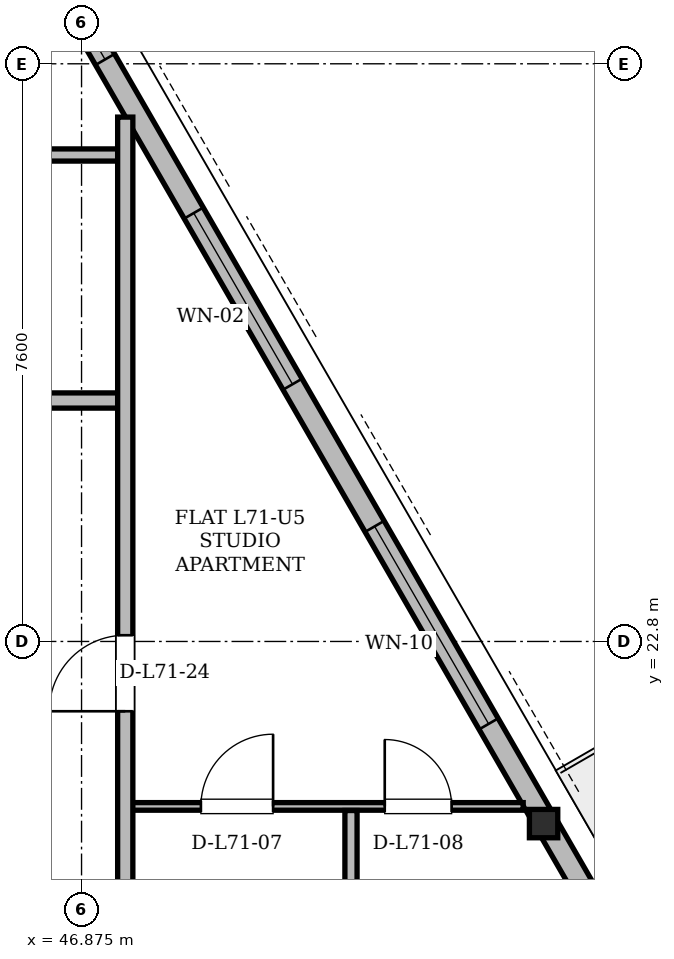
"""IFC4 building model, lengths in metres.
Left out: names, types, materials, properties, quantities, classifications, styles, units other than length and angle.
Written with IfcOpenShell. Run it as: python <this file> out.ifc"""

import sys

from ifc_helpers import new_model, si_unit, direction, frame, frame_2d, origin, origin_2d, place, context, subcontext, project, spatial, rectangle, i_section, extrude, element, fill, save


model = new_model("IFC4")
c1 = context("Model", 3, precision=1e-05, world=origin(), true_north=direction((0.0, 1.0)))
c2 = subcontext(c1, "Body", "Model", "MODEL_VIEW")
j1 = project(units=[si_unit("LENGTHUNIT", "METRE"), si_unit("PLANEANGLEUNIT", "RADIAN")], contexts=[c1])
p1 = place(None, origin())
s1 = spatial("IfcSite", under=j1, at=p1, CompositionType="ELEMENT")
p2 = place(p1, origin())
s2 = spatial("IfcBuilding", under=s1, at=p2, CompositionType="ELEMENT")
p3 = place(p2, frame((0.0, 0.0, 269.4)))
s3 = spatial("IfcBuildingStorey", under=s2, at=p3, CompositionType="ELEMENT", Elevation=269.4)
p4 = place(p3, frame((52.977, 20.423, 0.005), z_axis=(-0.011983262451, -0.009724637068, 0.999880909336), x_axis=(0.630133366333, -0.776486922384, 0.0)))
e1 = element("IfcColumn", 1, at=p4, inside=s3, PredefinedType="COLUMN", context=c2, shape_type="SweptSolid", body=[
    extrude(i_section(OverallWidth=0.373, OverallDepth=0.373, WebThickness=0.016, FlangeThickness=0.026, at=origin_2d()), origin(), (0.0, 0.0, 1.0), 3.891),
])
p5 = place(p3, frame((58.572, 10.733, 0.0), z_axis=(0.0, 0.0, 1.0), x_axis=(-0.500001430823, 0.866024577697, 0.0)))
e2 = element("IfcWall", 2, at=p5, inside=s3, PredefinedType="SOLIDWALL", context=c2, shape_type="SweptSolid", body=[
    extrude(rectangle(XDim=37.296, YDim=0.29, at=frame_2d((18.648, 0.0))), origin(), (0.0, 0.0, 1.0), 3.058),
])
p6 = place(p5, frame((8.454, 0.0, 0.0)))
e3 = element("IfcOpeningElement", 3, at=p6, cuts=e2, PredefinedType="OPENING", context=c2, shape_type="SweptSolid", body=[
    extrude(rectangle(XDim=1.5, YDim=2.2, at=frame_2d((0.75, 1.1))), frame((0.0, 0.145, 0.0), z_axis=(0.0, -1.0, 0.0), x_axis=(1.0, 0.0, 0.0)), (0.0, 0.0, 1.0), 0.29),
])
p7 = place(p5, frame((28.796, 0.0, 0.0)))
e4 = element("IfcOpeningElement", 4, at=p7, cuts=e2, PredefinedType="OPENING", context=c2, shape_type="SweptSolid", body=[
    extrude(rectangle(XDim=1.5, YDim=2.2, at=frame_2d((0.75, 1.1))), frame((0.0, 0.145, 0.0), z_axis=(0.0, -1.0, 0.0), x_axis=(1.0, 0.0, 0.0)), (0.0, 0.0, 1.0), 0.29),
])
p8 = place(p5, frame((0.77, 0.0, 0.85)))
e5 = element("IfcOpeningElement", 5, at=p8, cuts=e2, PredefinedType="OPENING", context=c2, shape_type="SweptSolid", body=[
    extrude(rectangle(XDim=1.2, YDim=1.48, at=frame_2d((0.6, 0.74))), frame((0.0, 0.145, 0.0), z_axis=(0.0, -1.0, 0.0), x_axis=(1.0, 0.0, 0.0)), (0.0, 0.0, 1.0), 0.29),
])
p9 = place(p5, frame((2.285, 0.0, 0.85)))
e6 = element("IfcOpeningElement", 6, at=p9, cuts=e2, PredefinedType="OPENING", context=c2, shape_type="SweptSolid", body=[
    extrude(rectangle(XDim=1.2, YDim=1.48, at=frame_2d((0.6, 0.74))), frame((0.0, 0.145, 0.0), z_axis=(0.0, -1.0, 0.0), x_axis=(1.0, 0.0, 0.0)), (0.0, 0.0, 1.0), 0.29),
])
p10 = place(p5, frame((6.772, 0.0, 0.85)))
e7 = element("IfcOpeningElement", 7, at=p10, cuts=e2, PredefinedType="OPENING", context=c2, shape_type="SweptSolid", body=[
    extrude(rectangle(XDim=1.2, YDim=1.48, at=frame_2d((0.6, 0.74))), frame((0.0, 0.145, 0.0), z_axis=(0.0, -1.0, 0.0), x_axis=(1.0, 0.0, 0.0)), (0.0, 0.0, 1.0), 0.29),
])
p11 = place(p5, frame((12.682, 0.0, 0.85)))
e8 = element("IfcOpeningElement", 8, at=p11, cuts=e2, PredefinedType="OPENING", context=c2, shape_type="SweptSolid", body=[
    extrude(rectangle(XDim=3.0, YDim=2.098, at=frame_2d((1.5, 1.049))), frame((0.0, 0.145, 0.0), z_axis=(0.0, -1.0, 0.0), x_axis=(1.0, 0.0, 0.0)), (0.0, 0.0, 1.0), 0.29),
])
p12 = place(p5, frame((17.842, 0.0, 0.85)))
e9 = element("IfcOpeningElement", 9, at=p12, cuts=e2, PredefinedType="OPENING", context=c2, shape_type="SweptSolid", body=[
    extrude(rectangle(XDim=2.6, YDim=1.95, at=frame_2d((1.3, 0.975))), frame((0.0, 0.145, 0.0), z_axis=(0.0, -1.0, 0.0), x_axis=(1.0, 0.0, 0.0)), (0.0, 0.0, 1.0), 0.29),
])
p13 = place(p5, frame((35.217, 0.0, 0.85)))
e10 = element("IfcOpeningElement", 10, at=p13, cuts=e2, PredefinedType="OPENING", context=c2, shape_type="SweptSolid", body=[
    extrude(rectangle(XDim=1.2, YDim=1.48, at=frame_2d((0.6, 0.74))), frame((0.0, 0.145, 0.0), z_axis=(0.0, -1.0, 0.0), x_axis=(1.0, 0.0, 0.0)), (0.0, 0.0, 1.0), 0.29),
])
p14 = place(p5, frame((33.737, 0.0, 0.85)))
e11 = element("IfcOpeningElement", 11, at=p14, cuts=e2, PredefinedType="OPENING", context=c2, shape_type="SweptSolid", body=[
    extrude(rectangle(XDim=1.2, YDim=1.48, at=frame_2d((0.6, 0.74))), frame((0.0, 0.145, 0.0), z_axis=(0.0, -1.0, 0.0), x_axis=(1.0, 0.0, 0.0)), (0.0, 0.0, 1.0), 0.29),
])
p15 = place(p5, frame((22.775, 0.0, 0.85)))
e12 = element("IfcOpeningElement", 12, at=p15, cuts=e2, PredefinedType="OPENING", context=c2, shape_type="SweptSolid", body=[
    extrude(rectangle(XDim=1.2, YDim=1.48, at=frame_2d((0.6, 0.74))), frame((0.0, 0.145, 0.0), z_axis=(0.0, -1.0, 0.0), x_axis=(1.0, 0.0, 0.0)), (0.0, 0.0, 1.0), 0.29),
])
p16 = place(p5, frame((31.663, 0.0, 0.85)))
e13 = element("IfcOpeningElement", 13, at=p16, cuts=e2, PredefinedType="OPENING", context=c2, shape_type="SweptSolid", body=[
    extrude(rectangle(XDim=1.2, YDim=1.48, at=frame_2d((0.6, 0.74))), frame((0.0, 0.145, 0.0), z_axis=(0.0, -1.0, 0.0), x_axis=(1.0, 0.0, 0.0)), (0.0, 0.0, 1.0), 0.29),
])
p17 = place(p3, frame((47.4, 20.63, 0.0), z_axis=(0.0, 0.0, 1.0), x_axis=(1.0, 0.0, 0.0)))
e14 = element("IfcWall", 14, at=p17, inside=s3, PredefinedType="PARTITIONING", context=c2, shape_type="SweptSolid", body=[
    extrude(rectangle(XDim=5.286, YDim=0.1, at=frame_2d((2.643, 0.0))), origin(), (0.0, 0.0, 1.0), 3.68),
])
p18 = place(p17, frame((1.045, 0.0, 0.0)))
e15 = element("IfcOpeningElement", 15, at=p18, cuts=e14, PredefinedType="OPENING", context=c2, shape_type="SweptSolid", body=[
    extrude(rectangle(XDim=0.95, YDim=2.1, at=frame_2d((0.475, 1.05))), frame((0.0, 0.05, 0.0), z_axis=(0.0, -1.0, 0.0), x_axis=(1.0, 0.0, 0.0)), (0.0, 0.0, 1.0), 0.1),
])
p19 = place(p17, frame((3.464, 0.0, 0.0)))
e16 = element("IfcOpeningElement", 16, at=p19, cuts=e14, PredefinedType="OPENING", context=c2, shape_type="SweptSolid", body=[
    extrude(rectangle(XDim=0.88, YDim=2.08, at=frame_2d((0.44, 1.04))), frame((0.0, 0.05, 0.0), z_axis=(0.0, -1.0, 0.0), x_axis=(1.0, 0.0, 0.0)), (0.0, 0.0, 1.0), 0.1),
])
p20 = place(p3, frame((25.6, 25.97, 0.0), z_axis=(0.0, 0.0, 1.0), x_axis=(1.0, 0.0, 0.0)))
e17 = element("IfcWall", 17, at=p20, inside=s3, PredefinedType="PARTITIONING", context=c2, shape_type="SweptSolid", body=[
    extrude(rectangle(XDim=21.85, YDim=0.2, at=frame_2d((10.925, 0.0))), origin(), (0.0, 0.0, 1.0), 3.266),
])
p21 = place(p20, frame((3.971, 0.0, 0.0)))
e18 = element("IfcOpeningElement", 18, at=p21, cuts=e17, PredefinedType="OPENING", context=c2, shape_type="SweptSolid", body=[
    extrude(rectangle(XDim=1.0, YDim=2.18, at=frame_2d((0.5, 1.09))), frame((0.0, 0.1, 0.0), z_axis=(0.0, -1.0, 0.0), x_axis=(1.0, 0.0, 0.0)), (0.0, 0.0, 1.0), 0.2),
])
p22 = place(p20, frame((11.388, 0.0, 0.0)))
e19 = element("IfcOpeningElement", 19, at=p22, cuts=e17, PredefinedType="OPENING", context=c2, shape_type="SweptSolid", body=[
    extrude(rectangle(XDim=1.0, YDim=2.18, at=frame_2d((0.5, 1.09))), frame((0.0, 0.1, 0.0), z_axis=(0.0, -1.0, 0.0), x_axis=(1.0, 0.0, 0.0)), (0.0, 0.0, 1.0), 0.2),
])
p23 = place(p20, frame((18.78, 0.0, 0.0)))
e20 = element("IfcOpeningElement", 20, at=p23, cuts=e17, PredefinedType="OPENING", context=c2, shape_type="SweptSolid", body=[
    extrude(rectangle(XDim=1.0, YDim=2.18, at=frame_2d((0.5, 1.09))), frame((0.0, 0.1, 0.0), z_axis=(0.0, -1.0, 0.0), x_axis=(1.0, 0.0, 0.0)), (0.0, 0.0, 1.0), 0.2),
])
p24 = place(p3, frame((42.418, 29.2, 0.0), z_axis=(0.0, 0.0, 1.0), x_axis=(1.0, 0.0, 0.0)))
e21 = element("IfcWall", 21, at=p24, inside=s3, PredefinedType="PARTITIONING", context=c2, shape_type="SweptSolid", body=[
    extrude(rectangle(XDim=5.114, YDim=0.16, at=frame_2d((2.557, 0.0))), origin(), (0.0, 0.0, 1.0), 3.266),
])
p25 = place(p24, frame((2.117, 0.0, 0.0)))
e22 = element("IfcOpeningElement", 22, at=p25, cuts=e21, PredefinedType="OPENING", context=c2, shape_type="SweptSolid", body=[
    extrude(rectangle(XDim=0.88, YDim=2.08, at=frame_2d((0.44, 1.04))), frame((0.0, 0.08, 0.0), z_axis=(0.0, -1.0, 0.0), x_axis=(1.0, 0.0, 0.0)), (0.0, 0.0, 1.0), 0.16),
])
p26 = place(p3, frame((47.45, 6.684, 0.0), z_axis=(0.0, 0.0, 1.0), x_axis=(0.0, 1.0, 0.0)))
e23 = element("IfcWall", 23, at=p26, inside=s3, PredefinedType="PARTITIONING", context=c2, shape_type="SweptSolid", body=[
    extrude(rectangle(XDim=23.015, YDim=0.2, at=frame_2d((11.507, 0.0))), origin(), (0.0, 0.0, 1.0), 3.058),
])
p27 = place(p26, frame((7.212, 0.0, 0.0)))
e24 = element("IfcOpeningElement", 24, at=p27, cuts=e23, PredefinedType="OPENING", context=c2, shape_type="SweptSolid", body=[
    extrude(rectangle(XDim=1.0, YDim=2.18, at=frame_2d((0.5, 1.09))), frame((0.0, 0.1, 0.0), z_axis=(0.0, -1.0, 0.0), x_axis=(1.0, 0.0, 0.0)), (0.0, 0.0, 1.0), 0.2),
])
p28 = place(p26, frame((15.198, 0.0, 0.0)))
e25 = element("IfcOpeningElement", 25, at=p28, cuts=e23, PredefinedType="OPENING", context=c2, shape_type="SweptSolid", body=[
    extrude(rectangle(XDim=1.0, YDim=2.18, at=frame_2d((0.5, 1.09))), frame((0.0, 0.1, 0.0), z_axis=(0.0, -1.0, 0.0), x_axis=(1.0, 0.0, 0.0)), (0.0, 0.0, 1.0), 0.2),
])
p29 = place(p3, frame((50.42, 17.904, 0.0), z_axis=(0.0, 0.0, 1.0), x_axis=(0.0, 1.0, 0.0)))
e26 = element("IfcWall", 26, at=p29, inside=s3, PredefinedType="PARTITIONING", context=c2, shape_type="SweptSolid", body=[
    extrude(rectangle(XDim=2.672, YDim=0.16, at=frame_2d((1.336, 0.0))), origin(), (0.0, 0.0, 1.0), 3.68),
])
p30 = place(p11, origin())
e27 = element("IfcWindow", 27, at=p30, inside=s3, PartitioningType="SINGLE_PANEL", PredefinedType="WINDOW", context=c2, shape_type="SweptSolid", body=[
    extrude(rectangle(XDim=3.0, YDim=2.098, at=frame_2d((1.5, 1.049))), frame((0.0, 0.03, 0.0), z_axis=(0.0, -1.0, 0.0), x_axis=(1.0, 0.0, 0.0)), (0.0, 0.0, 1.0), 0.06),
])
fill(e8, e27)
p31 = place(p12, origin())
e28 = element("IfcWindow", 28, at=p31, inside=s3, PartitioningType="SINGLE_PANEL", PredefinedType="WINDOW", context=c2, shape_type="SweptSolid", body=[
    extrude(rectangle(XDim=2.6, YDim=1.95, at=frame_2d((1.3, 0.975))), frame((0.0, 0.03, 0.0), z_axis=(0.0, -1.0, 0.0), x_axis=(1.0, 0.0, 0.0)), (0.0, 0.0, 1.0), 0.06),
])
fill(e9, e28)
p32 = place(p15, origin())
e29 = element("IfcWindow", 29, at=p32, inside=s3, PartitioningType="SINGLE_PANEL", PredefinedType="WINDOW", context=c2, shape_type="SweptSolid", body=[
    extrude(rectangle(XDim=1.2, YDim=1.48, at=frame_2d((0.6, 0.74))), frame((0.0, 0.03, 0.0), z_axis=(0.0, -1.0, 0.0), x_axis=(1.0, 0.0, 0.0)), (0.0, 0.0, 1.0), 0.06),
])
fill(e12, e29)
p33 = place(p18, origin())
e30 = element("IfcDoor", 30, at=p33, inside=s3, OperationType="SINGLE_SWING_RIGHT", PredefinedType="DOOR", context=c2, shape_type="SweptSolid", body=[
    extrude(rectangle(XDim=0.95, YDim=2.1, at=frame_2d((0.475, 1.05))), frame((0.0, 0.025, 0.0), z_axis=(0.0, -1.0, 0.0), x_axis=(1.0, 0.0, 0.0)), (0.0, 0.0, 1.0), 0.05),
])
fill(e15, e30)
p34 = place(p19, origin())
e31 = element("IfcDoor", 31, at=p34, inside=s3, OperationType="SINGLE_SWING_LEFT", PredefinedType="DOOR", context=c2, shape_type="SweptSolid", body=[
    extrude(rectangle(XDim=0.88, YDim=2.08, at=frame_2d((0.44, 1.04))), frame((0.0, 0.025, 0.0), z_axis=(0.0, -1.0, 0.0), x_axis=(1.0, 0.0, 0.0)), (0.0, 0.0, 1.0), 0.05),
])
fill(e16, e31)
p35 = place(p28, origin())
e32 = element("IfcDoor", 32, at=p35, inside=s3, OperationType="SINGLE_SWING_LEFT", PredefinedType="DOOR", context=c2, shape_type="SweptSolid", body=[
    extrude(rectangle(XDim=1.0, YDim=2.18, at=frame_2d((0.5, 1.09))), frame((0.0, 0.025, 0.0), z_axis=(0.0, -1.0, 0.0), x_axis=(1.0, 0.0, 0.0)), (0.0, 0.0, 1.0), 0.05),
])
fill(e25, e32)
save(model, sys.argv[1])
